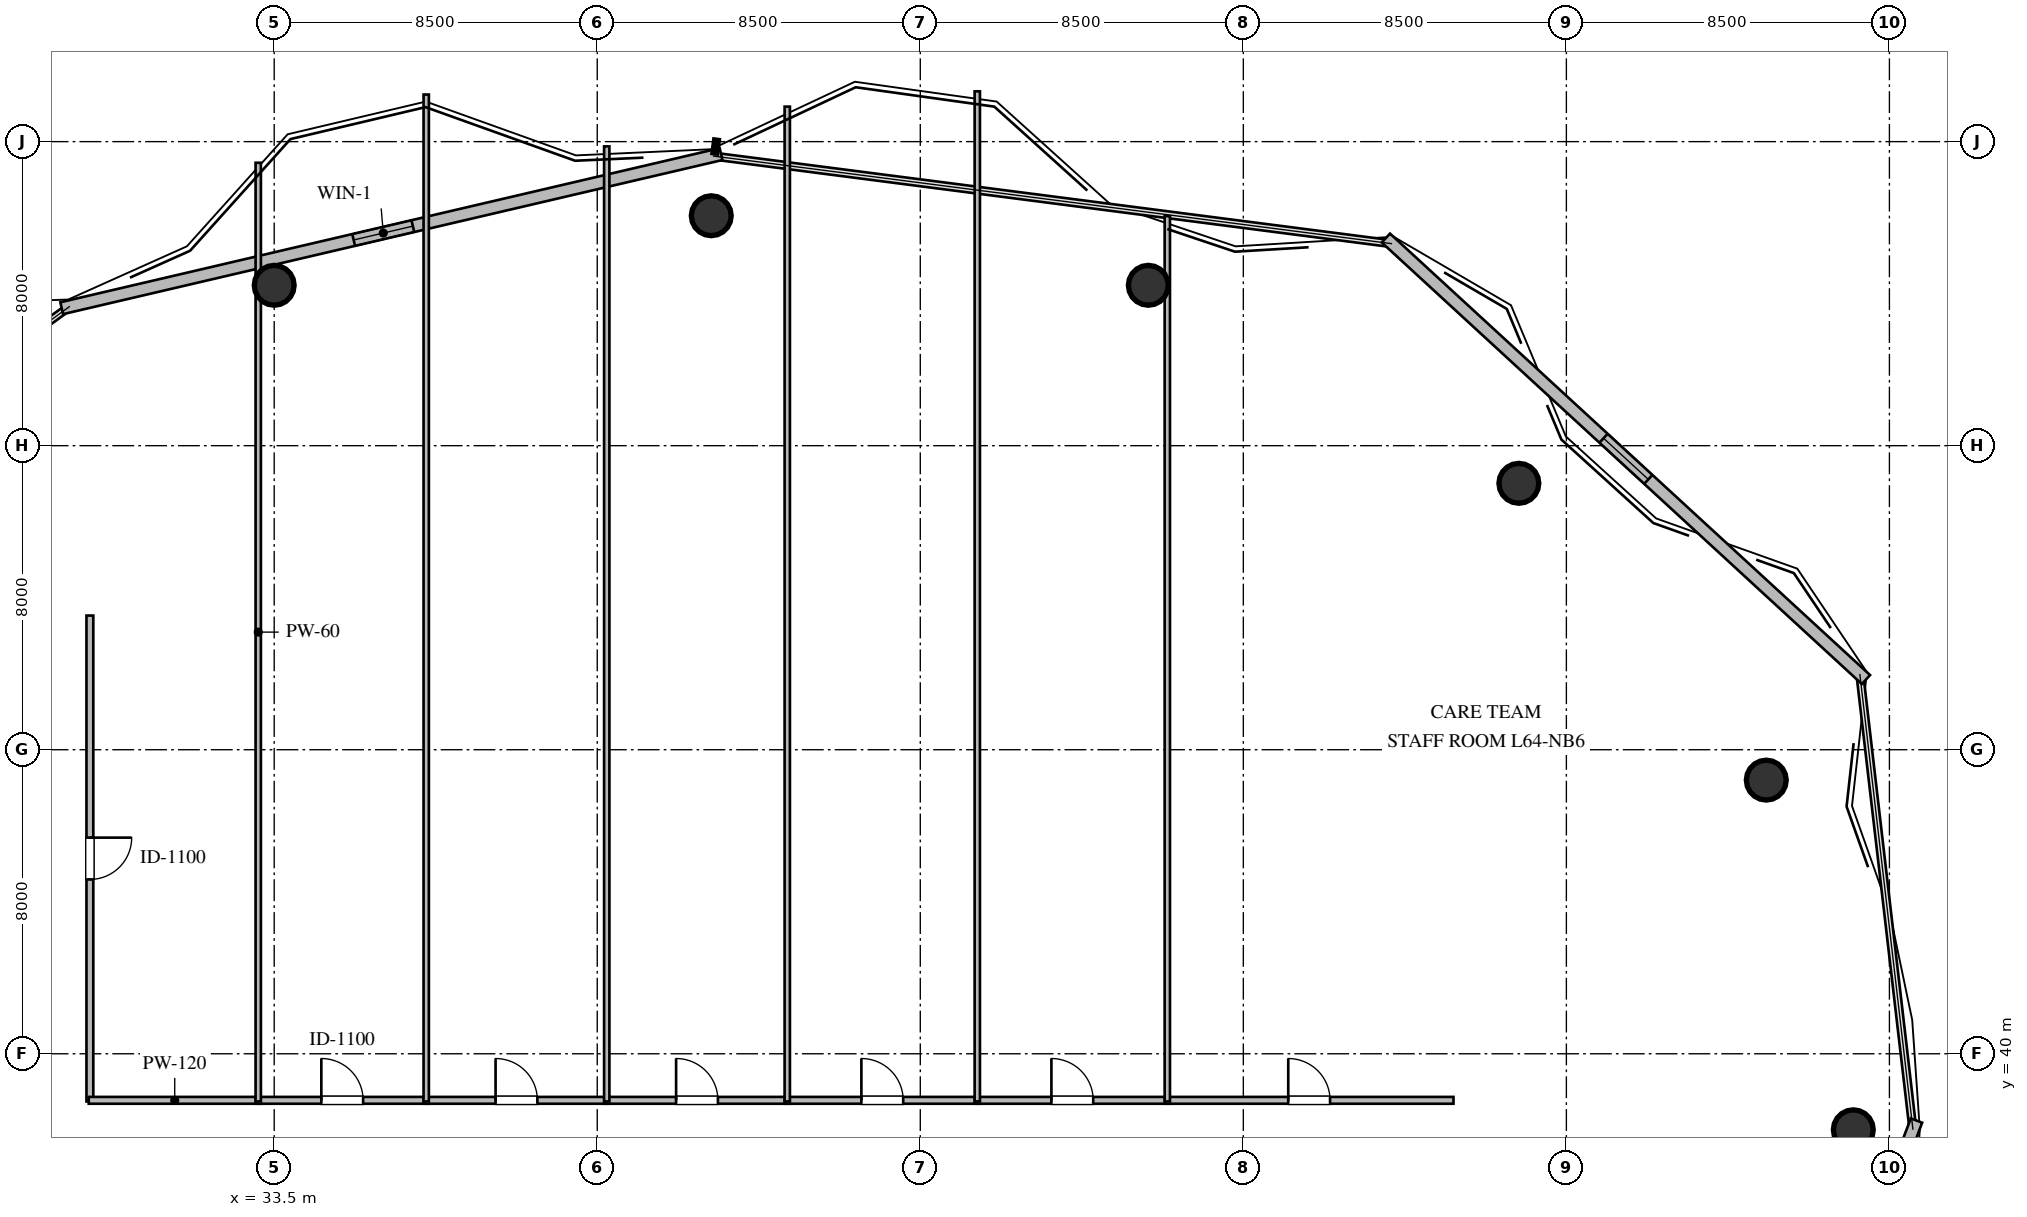
"""IFC4 building model, lengths in metres.
Left out: names, types, materials, properties, quantities, classifications, styles, units other than length and angle.
Written with IfcOpenShell. Run it as: python <this file> out.ifc"""

import sys

from ifc_helpers import new_model, si_unit, direction, frame, frame_2d, origin, origin_2d, place, context, subcontext, project, spatial, rectangle, circle, extrude, element, fill, save


model = new_model("IFC4")
c1 = context("Model", 3, precision=1e-05, world=origin(), true_north=direction((0.0, 1.0)))
c2 = subcontext(c1, "Body", "Model", "MODEL_VIEW")
j1 = project(units=[si_unit("LENGTHUNIT", "METRE"), si_unit("PLANEANGLEUNIT", "RADIAN")], contexts=[c1])
p1 = place(None, origin())
s1 = spatial("IfcSite", under=j1, at=p1, CompositionType="ELEMENT")
p2 = place(p1, origin())
s2 = spatial("IfcBuilding", under=s1, at=p2, CompositionType="ELEMENT")
p3 = place(p2, frame((0.0, 0.0, 242.4)))
s3 = spatial("IfcBuildingStorey", under=s2, at=p3, CompositionType="ELEMENT", Elevation=242.4)
for number, where, z_axis, x_axis in (
    (1, (75.05, 38.0, 0.0), (0.0, 0.0, 1.0), (1.0, 0.0, 0.0)),
    (2, (72.76, 47.2, 0.0), (0.0, 0.0, 1.0), (1.0, 0.0, 0.0)),
    (3, (66.25, 55.01, 0.0), (0.0, 0.0, 1.0), (1.0, 0.0, 0.0)),
    (4, (56.5, 60.22, 0.0), (0.0, 0.0, 1.0), (1.0, 0.0, 0.0)),
    (5, (45.0, 62.05, 0.0), (0.0, 0.0, 1.0), (1.0, 0.0, 0.0)),
    (6, (33.5, 60.22, 0.0), (0.0, 0.0, 1.0), (1.0, 0.0, 0.0)),
):
    element("IfcColumn", number, at=place(p3, frame(where, z_axis=z_axis, x_axis=x_axis)), inside=s3, PredefinedType="COLUMN", context=c2, shape_type="SweptSolid", body=[
        extrude(circle(Radius=0.525, at=origin_2d()), origin(), (0.0, 0.0, 1.0), 3.6),
    ])
p4 = place(p3, frame((76.712, 38.243, 0.0), z_axis=(0.0, 0.0, 1.0), x_axis=(-0.353659523244, -0.935374225441, 0.0)))
e7 = element("IfcWall", 7, at=p4, inside=s3, PredefinedType="STANDARD", context=c2, shape_type="SweptSolid", body=[
    extrude(rectangle(XDim=14.172, YDim=0.32, at=frame_2d((7.086, 0.0))), origin(), (0.0, 0.0, 1.0), 3.36),
])
p5 = place(p3, frame((27.909, 59.617, 0.0), z_axis=(0.0, 0.0, 1.0), x_axis=(0.973753606594, 0.227604731158, 0.0)))
e8 = element("IfcWall", 8, at=p5, inside=s3, PredefinedType="STANDARD", context=c2, shape_type="SweptSolid", body=[
    extrude(rectangle(XDim=17.817, YDim=0.32, at=frame_2d((8.908, 0.0))), origin(), (0.0, 0.0, 1.0), 3.36),
])
p6 = place(p5, frame((7.889, 0.0, 1.05)))
e9 = element("IfcOpeningElement", 9, at=p6, cuts=e8, PredefinedType="OPENING", context=c2, shape_type="SweptSolid", body=[
    extrude(rectangle(XDim=1.6, YDim=1.5, at=frame_2d((0.8, 0.75))), frame((0.0, 0.17, 0.0), z_axis=(0.0, -1.0, 0.0), x_axis=(1.0, 0.0, 0.0)), (0.0, 0.0, 1.0), 0.34),
])
p7 = place(p3, frame((62.751, 61.463, 0.0), z_axis=(0.0, 0.0, 1.0), x_axis=(0.736063690764, -0.676912286149, 0.0)))
e10 = element("IfcWall", 10, at=p7, inside=s3, PredefinedType="STANDARD", context=c2, shape_type="SweptSolid", body=[
    extrude(rectangle(XDim=17.162, YDim=0.32, at=frame_2d((8.581, 0.0))), origin(), (0.0, 0.0, 1.0), 3.36),
])
p8 = place(p7, frame((7.781, 0.0, 1.05)))
e11 = element("IfcOpeningElement", 11, at=p8, cuts=e10, PredefinedType="OPENING", context=c2, shape_type="SweptSolid", body=[
    extrude(rectangle(XDim=1.6, YDim=1.5, at=frame_2d((0.8, 0.75))), frame((0.0, 0.17, 0.0), z_axis=(0.0, -1.0, 0.0), x_axis=(1.0, 0.0, 0.0)), (0.0, 0.0, 1.0), 0.34),
])
p9 = place(p3, frame((28.65, 51.53, 0.0), z_axis=(0.0, 0.0, 1.0), x_axis=(0.0, -1.0, 0.0)))
e12 = element("IfcWall", 12, at=p9, inside=s3, PredefinedType="PARTITIONING", context=c2, shape_type="SweptSolid", body=[
    extrude(rectangle(XDim=12.785, YDim=0.18, at=frame_2d((6.393, 0.0))), origin(), (0.0, 0.0, 1.0), 3.36),
])
p10 = place(p9, frame((5.843, 0.0, 0.0)))
e13 = element("IfcOpeningElement", 13, at=p10, cuts=e12, PredefinedType="OPENING", context=c2, shape_type="SweptSolid", body=[
    extrude(rectangle(XDim=1.1, YDim=2.1, at=frame_2d((0.55, 1.05))), frame((0.0, 0.1, 0.0), z_axis=(0.0, -1.0, 0.0), x_axis=(1.0, 0.0, 0.0)), (0.0, 0.0, 1.0), 0.2),
])
p11 = place(p3, frame((28.62, 38.775, 0.0), z_axis=(0.0, 0.0, 1.0), x_axis=(1.0, 0.0, 0.0)))
e14 = element("IfcWall", 14, at=p11, inside=s3, PredefinedType="PARTITIONING", context=c2, shape_type="SweptSolid", body=[
    extrude(rectangle(XDim=4.525, YDim=0.18, at=frame_2d((2.262, 0.0))), origin(), (0.0, 0.0, 1.0), 3.36),
])
p12 = place(p3, frame((33.015, 38.775, 0.0), z_axis=(0.0, 0.0, 1.0), x_axis=(1.0, 0.0, 0.0)))
e15 = element("IfcWall", 15, at=p12, inside=s3, PredefinedType="PARTITIONING", context=c2, shape_type="SweptSolid", body=[
    extrude(rectangle(XDim=4.55, YDim=0.18, at=frame_2d((2.275, 0.0))), origin(), (0.0, 0.0, 1.0), 3.36),
])
p13 = place(p12, frame((1.725, 0.0, 0.0)))
e16 = element("IfcOpeningElement", 16, at=p13, cuts=e15, PredefinedType="OPENING", context=c2, shape_type="SweptSolid", body=[
    extrude(rectangle(XDim=1.1, YDim=2.1, at=frame_2d((0.55, 1.05))), frame((0.0, 0.1, 0.0), z_axis=(0.0, -1.0, 0.0), x_axis=(1.0, 0.0, 0.0)), (0.0, 0.0, 1.0), 0.2),
])
p14 = place(p3, frame((37.435, 38.775, 0.0), z_axis=(0.0, 0.0, 1.0), x_axis=(1.0, 0.0, 0.0)))
e17 = element("IfcWall", 17, at=p14, inside=s3, PredefinedType="PARTITIONING", context=c2, shape_type="SweptSolid", body=[
    extrude(rectangle(XDim=4.88, YDim=0.18, at=frame_2d((2.44, 0.0))), origin(), (0.0, 0.0, 1.0), 3.36),
])
p15 = place(p14, frame((1.89, 0.0, 0.0)))
e18 = element("IfcOpeningElement", 18, at=p15, cuts=e17, PredefinedType="OPENING", context=c2, shape_type="SweptSolid", body=[
    extrude(rectangle(XDim=1.1, YDim=2.1, at=frame_2d((0.55, 1.05))), frame((0.0, 0.1, 0.0), z_axis=(0.0, -1.0, 0.0), x_axis=(1.0, 0.0, 0.0)), (0.0, 0.0, 1.0), 0.2),
])
p16 = place(p3, frame((42.185, 38.775, 0.0), z_axis=(0.0, 0.0, 1.0), x_axis=(1.0, 0.0, 0.0)))
e19 = element("IfcWall", 19, at=p16, inside=s3, PredefinedType="PARTITIONING", context=c2, shape_type="SweptSolid", body=[
    extrude(rectangle(XDim=4.88, YDim=0.18, at=frame_2d((2.44, 0.0))), origin(), (0.0, 0.0, 1.0), 3.36),
])
p17 = place(p16, frame((1.89, 0.0, 0.0)))
e20 = element("IfcOpeningElement", 20, at=p17, cuts=e19, PredefinedType="OPENING", context=c2, shape_type="SweptSolid", body=[
    extrude(rectangle(XDim=1.1, YDim=2.1, at=frame_2d((0.55, 1.05))), frame((0.0, 0.1, 0.0), z_axis=(0.0, -1.0, 0.0), x_axis=(1.0, 0.0, 0.0)), (0.0, 0.0, 1.0), 0.2),
])
p18 = place(p3, frame((46.935, 38.775, 0.0), z_axis=(0.0, 0.0, 1.0), x_axis=(1.0, 0.0, 0.0)))
e21 = element("IfcWall", 21, at=p18, inside=s3, PredefinedType="PARTITIONING", context=c2, shape_type="SweptSolid", body=[
    extrude(rectangle(XDim=5.13, YDim=0.18, at=frame_2d((2.565, 0.0))), origin(), (0.0, 0.0, 1.0), 3.36),
])
p19 = place(p18, frame((2.015, 0.0, 0.0)))
e22 = element("IfcOpeningElement", 22, at=p19, cuts=e21, PredefinedType="OPENING", context=c2, shape_type="SweptSolid", body=[
    extrude(rectangle(XDim=1.1, YDim=2.1, at=frame_2d((0.55, 1.05))), frame((0.0, 0.1, 0.0), z_axis=(0.0, -1.0, 0.0), x_axis=(1.0, 0.0, 0.0)), (0.0, 0.0, 1.0), 0.2),
])
p20 = place(p3, frame((51.935, 38.775, 0.0), z_axis=(0.0, 0.0, 1.0), x_axis=(1.0, 0.0, 0.0)))
e23 = element("IfcWall", 23, at=p20, inside=s3, PredefinedType="PARTITIONING", context=c2, shape_type="SweptSolid", body=[
    extrude(rectangle(XDim=5.13, YDim=0.18, at=frame_2d((2.565, 0.0))), origin(), (0.0, 0.0, 1.0), 3.36),
])
p21 = place(p20, frame((2.015, 0.0, 0.0)))
e24 = element("IfcOpeningElement", 24, at=p21, cuts=e23, PredefinedType="OPENING", context=c2, shape_type="SweptSolid", body=[
    extrude(rectangle(XDim=1.1, YDim=2.1, at=frame_2d((0.55, 1.05))), frame((0.0, 0.1, 0.0), z_axis=(0.0, -1.0, 0.0), x_axis=(1.0, 0.0, 0.0)), (0.0, 0.0, 1.0), 0.2),
])
p22 = place(p3, frame((56.935, 38.775, 0.0), z_axis=(0.0, 0.0, 1.0), x_axis=(1.0, 0.0, 0.0)))
e25 = element("IfcWall", 25, at=p22, inside=s3, PredefinedType="PARTITIONING", context=c2, shape_type="SweptSolid", body=[
    extrude(rectangle(XDim=7.595, YDim=0.18, at=frame_2d((3.797, 0.0))), origin(), (0.0, 0.0, 1.0), 3.36),
])
p23 = place(p22, frame((3.247, 0.0, 0.0)))
e26 = element("IfcOpeningElement", 26, at=p23, cuts=e25, PredefinedType="OPENING", context=c2, shape_type="SweptSolid", body=[
    extrude(rectangle(XDim=1.1, YDim=2.1, at=frame_2d((0.55, 1.05))), frame((0.0, 0.1, 0.0), z_axis=(0.0, -1.0, 0.0), x_axis=(1.0, 0.0, 0.0)), (0.0, 0.0, 1.0), 0.2),
])
p24 = place(p3, frame((33.08, 63.444, 0.0), z_axis=(0.0, 0.0, 1.0), x_axis=(0.0, -1.0, 0.0)))
e27 = element("IfcWall", 27, at=p24, inside=s3, PredefinedType="PARTITIONING", context=c2, shape_type="SweptSolid", body=[
    extrude(rectangle(XDim=24.699, YDim=0.14, at=frame_2d((12.35, 0.0))), origin(), (0.0, 0.0, 1.0), 2.806),
])
p25 = place(p3, frame((37.5, 65.239, 0.0), z_axis=(0.0, 0.0, 1.0), x_axis=(0.0, -1.0, 0.0)))
e28 = element("IfcWall", 28, at=p25, inside=s3, PredefinedType="PARTITIONING", context=c2, shape_type="SweptSolid", body=[
    extrude(rectangle(XDim=26.494, YDim=0.14, at=frame_2d((13.247, 0.0))), origin(), (0.0, 0.0, 1.0), 3.36),
])
p26 = place(p3, frame((42.25, 63.875, 0.0), z_axis=(0.0, 0.0, 1.0), x_axis=(0.0, -1.0, 0.0)))
e29 = element("IfcWall", 29, at=p26, inside=s3, PredefinedType="PARTITIONING", context=c2, shape_type="SweptSolid", body=[
    extrude(rectangle(XDim=25.13, YDim=0.14, at=frame_2d((12.565, 0.0))), origin(), (0.0, 0.0, 1.0), 3.36),
])
p27 = place(p3, frame((47.0, 64.921, 0.0), z_axis=(0.0, 0.0, 1.0), x_axis=(0.0, -1.0, 0.0)))
e30 = element("IfcWall", 30, at=p27, inside=s3, PredefinedType="PARTITIONING", context=c2, shape_type="SweptSolid", body=[
    extrude(rectangle(XDim=26.176, YDim=0.14, at=frame_2d((13.088, 0.0))), origin(), (0.0, 0.0, 1.0), 3.36),
])
p28 = place(p3, frame((52.0, 65.324, 0.0), z_axis=(0.0, 0.0, 1.0), x_axis=(0.0, -1.0, 0.0)))
e31 = element("IfcWall", 31, at=p28, inside=s3, PredefinedType="PARTITIONING", context=c2, shape_type="SweptSolid", body=[
    extrude(rectangle(XDim=26.579, YDim=0.14, at=frame_2d((13.29, 0.0))), origin(), (0.0, 0.0, 1.0), 3.36),
])
p29 = place(p3, frame((57.0, 62.039, 0.0), z_axis=(0.0, 0.0, 1.0), x_axis=(0.0, -1.0, 0.0)))
e32 = element("IfcWall", 32, at=p29, inside=s3, PredefinedType="PARTITIONING", context=c2, shape_type="SweptSolid", body=[
    extrude(rectangle(XDim=23.294, YDim=0.14, at=frame_2d((11.647, 0.0))), origin(), (0.0, 0.0, 1.0), 3.36),
])
p30 = place(p6, origin())
e33 = element("IfcWindow", 33, at=p30, inside=s3, PartitioningType="SINGLE_PANEL", PredefinedType="WINDOW", context=c2, shape_type="SweptSolid", body=[
    extrude(rectangle(XDim=1.6, YDim=1.5, at=frame_2d((0.8, 0.75))), frame((0.0, 0.03, 0.0), z_axis=(0.0, -1.0, 0.0), x_axis=(1.0, 0.0, 0.0)), (0.0, 0.0, 1.0), 0.06),
])
fill(e9, e33)
p31 = place(p8, origin())
e34 = element("IfcWindow", 34, at=p31, inside=s3, PartitioningType="SINGLE_PANEL", PredefinedType="WINDOW", context=c2, shape_type="SweptSolid", body=[
    extrude(rectangle(XDim=1.6, YDim=1.5, at=frame_2d((0.8, 0.75))), frame((0.0, 0.03, 0.0), z_axis=(0.0, -1.0, 0.0), x_axis=(1.0, 0.0, 0.0)), (0.0, 0.0, 1.0), 0.06),
])
fill(e11, e34)
p32 = place(p10, origin())
e35 = element("IfcDoor", 35, at=p32, inside=s3, OperationType="SINGLE_SWING_LEFT", PredefinedType="DOOR", context=c2, shape_type="SweptSolid", body=[
    extrude(rectangle(XDim=1.1, YDim=2.1, at=frame_2d((0.55, 1.05))), frame((0.0, 0.025, 0.0), z_axis=(0.0, -1.0, 0.0), x_axis=(1.0, 0.0, 0.0)), (0.0, 0.0, 1.0), 0.05),
])
fill(e13, e35)
p33 = place(p13, origin())
e36 = element("IfcDoor", 36, at=p33, inside=s3, OperationType="SINGLE_SWING_LEFT", PredefinedType="DOOR", context=c2, shape_type="SweptSolid", body=[
    extrude(rectangle(XDim=1.1, YDim=2.1, at=frame_2d((0.55, 1.05))), frame((0.0, 0.025, 0.0), z_axis=(0.0, -1.0, 0.0), x_axis=(1.0, 0.0, 0.0)), (0.0, 0.0, 1.0), 0.05),
])
fill(e16, e36)
p34 = place(p15, origin())
e37 = element("IfcDoor", 37, at=p34, inside=s3, OperationType="SINGLE_SWING_LEFT", PredefinedType="DOOR", context=c2, shape_type="SweptSolid", body=[
    extrude(rectangle(XDim=1.1, YDim=2.1, at=frame_2d((0.55, 1.05))), frame((0.0, 0.025, 0.0), z_axis=(0.0, -1.0, 0.0), x_axis=(1.0, 0.0, 0.0)), (0.0, 0.0, 1.0), 0.05),
])
fill(e18, e37)
p35 = place(p17, origin())
e38 = element("IfcDoor", 38, at=p35, inside=s3, OperationType="SINGLE_SWING_LEFT", PredefinedType="DOOR", context=c2, shape_type="SweptSolid", body=[
    extrude(rectangle(XDim=1.1, YDim=2.1, at=frame_2d((0.55, 1.05))), frame((0.0, 0.025, 0.0), z_axis=(0.0, -1.0, 0.0), x_axis=(1.0, 0.0, 0.0)), (0.0, 0.0, 1.0), 0.05),
])
fill(e20, e38)
p36 = place(p19, origin())
e39 = element("IfcDoor", 39, at=p36, inside=s3, OperationType="SINGLE_SWING_LEFT", PredefinedType="DOOR", context=c2, shape_type="SweptSolid", body=[
    extrude(rectangle(XDim=1.1, YDim=2.1, at=frame_2d((0.55, 1.05))), frame((0.0, 0.025, 0.0), z_axis=(0.0, -1.0, 0.0), x_axis=(1.0, 0.0, 0.0)), (0.0, 0.0, 1.0), 0.05),
])
fill(e22, e39)
p37 = place(p21, origin())
e40 = element("IfcDoor", 40, at=p37, inside=s3, OperationType="SINGLE_SWING_LEFT", PredefinedType="DOOR", context=c2, shape_type="SweptSolid", body=[
    extrude(rectangle(XDim=1.1, YDim=2.1, at=frame_2d((0.55, 1.05))), frame((0.0, 0.025, 0.0), z_axis=(0.0, -1.0, 0.0), x_axis=(1.0, 0.0, 0.0)), (0.0, 0.0, 1.0), 0.05),
])
fill(e24, e40)
p38 = place(p23, origin())
e41 = element("IfcDoor", 41, at=p38, inside=s3, OperationType="SINGLE_SWING_LEFT", PredefinedType="DOOR", context=c2, shape_type="SweptSolid", body=[
    extrude(rectangle(XDim=1.1, YDim=2.1, at=frame_2d((0.55, 1.05))), frame((0.0, 0.025, 0.0), z_axis=(0.0, -1.0, 0.0), x_axis=(1.0, 0.0, 0.0)), (0.0, 0.0, 1.0), 0.05),
])
fill(e26, e41)
save(model, sys.argv[1])
